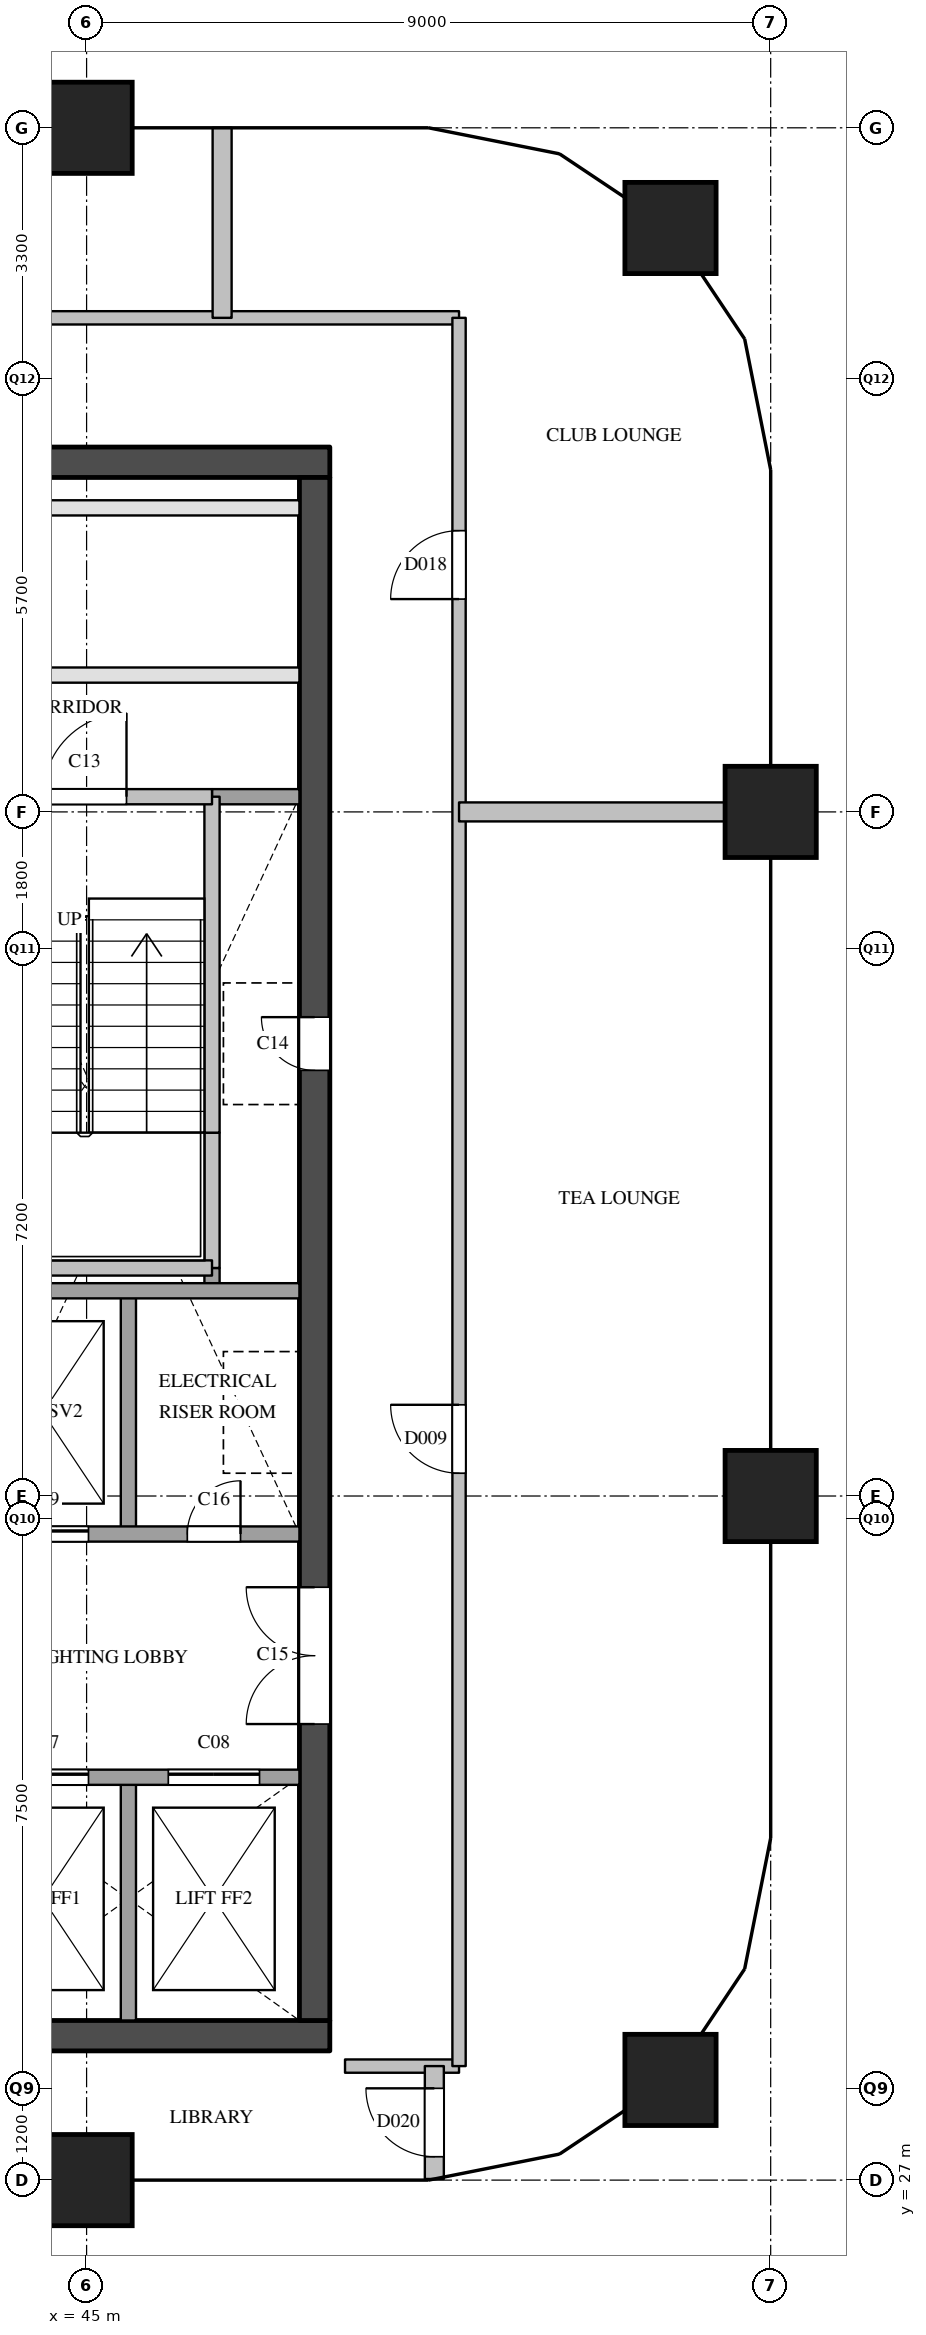
"""IFC4 building model, lengths in metres.
Left out: names, types, materials, properties, quantities, classifications, styles, units other than length and angle.
Written with IfcOpenShell. Run it as: python <this file> out.ifc"""

import sys

from ifc_helpers import new_model, si_unit, direction, frame, frame_2d, origin, origin_2d, place, context, subcontext, project, spatial, rectangle, extrude, element, fill, save


model = new_model("IFC4")
c1 = context("Model", 3, precision=1e-05, world=origin(), true_north=direction((0.0, 1.0)))
c2 = subcontext(c1, "Body", "Model", "MODEL_VIEW")
j1 = project(units=[si_unit("LENGTHUNIT", "METRE"), si_unit("PLANEANGLEUNIT", "RADIAN")], contexts=[c1])
p1 = place(None, origin())
s1 = spatial("IfcSite", under=j1, at=p1, CompositionType="ELEMENT")
p2 = place(p1, origin())
s2 = spatial("IfcBuilding", under=s1, at=p2, CompositionType="ELEMENT")
p3 = place(p2, frame((0.0, 0.0, 250.1)))
s3 = spatial("IfcBuildingStorey", under=s2, at=p3, CompositionType="ELEMENT", Elevation=250.1)
for number, where, z_axis, x_axis in (
    (1, (45.0, 27.0, 0.0), (0.0, 0.0, 1.0), (1.0, 0.0, 0.0)),
    (2, (45.0, 54.0, 0.0), (0.0, 0.0, 1.0), (1.0, 0.0, 0.0)),
    (3, (52.682, 28.318, 0.0), (0.0, 0.0, 1.0), (1.0, 0.0, 0.0)),
    (4, (54.0, 36.0, 0.0), (0.0, 0.0, 1.0), (1.0, 0.0, 0.0)),
    (5, (54.0, 45.0, 0.0), (0.0, 0.0, 1.0), (1.0, 0.0, 0.0)),
    (6, (52.682, 52.682, 0.0), (0.0, 0.0, 1.0), (1.0, 0.0, 0.0)),
):
    element("IfcColumn", number, at=place(p3, frame(where, z_axis=z_axis, x_axis=x_axis)), inside=s3, PredefinedType="COLUMN", context=c2, shape_type="SweptSolid", body=[
        extrude(rectangle(XDim=1.2, YDim=1.2, at=origin_2d()), origin(), (0.0, 0.0, 1.0), 3.9),
    ])
p4 = place(p3, frame((36.2, 28.9, 0.0), z_axis=(0.0, 0.0, 1.0), x_axis=(1.0, 0.0, 0.0)))
e7 = element("IfcWall", 7, at=p4, inside=s3, PredefinedType="SHEAR", context=c2, shape_type="SweptSolid", body=[
    extrude(rectangle(XDim=12.0, YDim=0.4, at=frame_2d((6.0, 0.0))), origin(), (0.0, 0.0, 1.0), 3.6),
])
p5 = place(p4, frame((0.85, 0.0, 0.0)))
e8 = element("IfcOpeningElement", 8, at=p5, cuts=e7, PredefinedType="OPENING", context=c2, shape_type="SweptSolid", body=[
    extrude(rectangle(XDim=1.2, YDim=2.1, at=frame_2d((0.6, 1.05))), frame((0.0, 0.21, 0.0), z_axis=(0.0, -1.0, 0.0), x_axis=(1.0, 0.0, 0.0)), (0.0, 0.0, 1.0), 0.42),
])
p6 = place(p4, frame((2.95, 0.0, 0.0)))
e9 = element("IfcOpeningElement", 9, at=p6, cuts=e7, PredefinedType="OPENING", context=c2, shape_type="SweptSolid", body=[
    extrude(rectangle(XDim=1.2, YDim=2.1, at=frame_2d((0.6, 1.05))), frame((0.0, 0.21, 0.0), z_axis=(0.0, -1.0, 0.0), x_axis=(1.0, 0.0, 0.0)), (0.0, 0.0, 1.0), 0.42),
])
p7 = place(p4, frame((5.05, 0.0, 0.0)))
e10 = element("IfcOpeningElement", 10, at=p7, cuts=e7, PredefinedType="OPENING", context=c2, shape_type="SweptSolid", body=[
    extrude(rectangle(XDim=1.2, YDim=2.1, at=frame_2d((0.6, 1.05))), frame((0.0, 0.21, 0.0), z_axis=(0.0, -1.0, 0.0), x_axis=(1.0, 0.0, 0.0)), (0.0, 0.0, 1.0), 0.42),
])
p8 = place(p3, frame((36.2, 49.6, 0.0), z_axis=(0.0, 0.0, 1.0), x_axis=(1.0, 0.0, 0.0)))
e11 = element("IfcWall", 11, at=p8, inside=s3, PredefinedType="SHEAR", context=c2, shape_type="SweptSolid", body=[
    extrude(rectangle(XDim=12.0, YDim=0.4, at=frame_2d((6.0, 0.0))), origin(), (0.0, 0.0, 1.0), 3.6),
])
p9 = place(p3, frame((48.0, 29.1, 0.0), z_axis=(0.0, 0.0, 1.0), x_axis=(0.0, 1.0, 0.0)))
e12 = element("IfcWall", 12, at=p9, inside=s3, PredefinedType="SHEAR", context=c2, shape_type="SweptSolid", body=[
    extrude(rectangle(XDim=20.3, YDim=0.4, at=frame_2d((10.15, 0.0))), origin(), (0.0, 0.0, 1.0), 3.6),
])
p10 = place(p9, frame((12.5, 0.0, 0.0)))
e13 = element("IfcOpeningElement", 13, at=p10, cuts=e12, PredefinedType="OPENING", context=c2, shape_type="SweptSolid", body=[
    extrude(rectangle(XDim=0.7, YDim=2.1, at=frame_2d((0.35, 1.05))), frame((0.0, 0.21, 0.0), z_axis=(0.0, -1.0, 0.0), x_axis=(1.0, 0.0, 0.0)), (0.0, 0.0, 1.0), 0.42),
])
p11 = place(p9, frame((3.9, 0.0, 0.0)))
e14 = element("IfcOpeningElement", 14, at=p11, cuts=e12, PredefinedType="OPENING", context=c2, shape_type="SweptSolid", body=[
    extrude(rectangle(XDim=1.8, YDim=2.1, at=frame_2d((0.9, 1.05))), frame((0.0, 0.21, 0.0), z_axis=(0.0, -1.0, 0.0), x_axis=(1.0, 0.0, 0.0)), (0.0, 0.0, 1.0), 0.42),
])
for number, where, z_axis, x_axis in (
    (15, (45.55, 29.1, 0.0), (0.0, 0.0, 1.0), (0.0, 1.0, 0.0)),
    (16, (45.55, 35.5, 0.0), (0.0, 0.0, 1.0), (0.0, 1.0, 0.0)),
):
    element("IfcWall", number, at=place(p3, frame(where, z_axis=z_axis, x_axis=x_axis)), inside=s3, PredefinedType="SOLIDWALL", context=c2, shape_type="SweptSolid", body=[
        extrude(rectangle(XDim=3.2, YDim=0.2, at=frame_2d((1.6, 0.0))), origin(), (0.0, 0.0, 1.0), 3.6),
    ])
p12 = place(p3, frame((46.65, 38.7, 0.0), z_axis=(0.0, 0.0, 1.0), x_axis=(0.0, 1.0, 0.0)))
e17 = element("IfcWall", 17, at=p12, inside=s3, PredefinedType="SOLIDWALL", context=c2, shape_type="SweptSolid", body=[
    extrude(rectangle(XDim=0.3, YDim=0.2, at=frame_2d((0.15, 0.0))), origin(), (0.0, 0.0, 1.0), 3.6),
])
p13 = place(p3, frame((46.65, 39.0, 0.0), z_axis=(0.0, 0.0, 1.0), x_axis=(0.0, 1.0, 0.0)))
e18 = element("IfcWall", 18, at=p13, inside=s3, PredefinedType="SOLIDWALL", context=c2, shape_type="SweptSolid", body=[
    extrude(rectangle(XDim=1.78, YDim=0.2, at=frame_2d((0.89, 0.0))), origin(), (0.0, 0.0, 1.0), 3.6),
])
p14 = place(p3, frame((46.65, 40.78, 0.0), z_axis=(0.0, 0.0, 1.0), x_axis=(0.0, 1.0, 0.0)))
e19 = element("IfcWall", 19, at=p14, inside=s3, PredefinedType="SOLIDWALL", context=c2, shape_type="SweptSolid", body=[
    extrude(rectangle(XDim=4.42, YDim=0.2, at=frame_2d((2.21, 0.0))), origin(), (0.0, 0.0, 1.0), 3.6),
])
p15 = place(p3, frame((36.6, 32.3, 0.0), z_axis=(0.0, 0.0, 1.0), x_axis=(1.0, 0.0, 0.0)))
e20 = element("IfcWall", 20, at=p15, inside=s3, PredefinedType="SOLIDWALL", context=c2, shape_type="SweptSolid", body=[
    extrude(rectangle(XDim=11.2, YDim=0.2, at=frame_2d((5.6, 0.0))), origin(), (0.0, 0.0, 1.0), 3.6),
])
p16 = place(p15, frame((7.225, 0.0, 0.0)))
e21 = element("IfcOpeningElement", 21, at=p16, cuts=e20, PredefinedType="OPENING", context=c2, shape_type="SweptSolid", body=[
    extrude(rectangle(XDim=1.2, YDim=2.1, at=frame_2d((0.6, 1.05))), frame((0.0, 0.11, 0.0), z_axis=(0.0, -1.0, 0.0), x_axis=(1.0, 0.0, 0.0)), (0.0, 0.0, 1.0), 0.22),
])
p17 = place(p15, frame((9.475, 0.0, 0.0)))
e22 = element("IfcOpeningElement", 22, at=p17, cuts=e20, PredefinedType="OPENING", context=c2, shape_type="SweptSolid", body=[
    extrude(rectangle(XDim=1.2, YDim=2.1, at=frame_2d((0.6, 1.05))), frame((0.0, 0.11, 0.0), z_axis=(0.0, -1.0, 0.0), x_axis=(1.0, 0.0, 0.0)), (0.0, 0.0, 1.0), 0.22),
])
p18 = place(p3, frame((43.3, 35.5, 0.0), z_axis=(0.0, 0.0, 1.0), x_axis=(1.0, 0.0, 0.0)))
e23 = element("IfcWall", 23, at=p18, inside=s3, PredefinedType="SOLIDWALL", context=c2, shape_type="SweptSolid", body=[
    extrude(rectangle(XDim=4.5, YDim=0.2, at=frame_2d((2.25, 0.0))), origin(), (0.0, 0.0, 1.0), 3.6),
])
p19 = place(p18, frame((0.525, 0.0, 0.0)))
e24 = element("IfcOpeningElement", 24, at=p19, cuts=e23, PredefinedType="OPENING", context=c2, shape_type="SweptSolid", body=[
    extrude(rectangle(XDim=1.2, YDim=2.1, at=frame_2d((0.6, 1.05))), frame((0.0, 0.11, 0.0), z_axis=(0.0, -1.0, 0.0), x_axis=(1.0, 0.0, 0.0)), (0.0, 0.0, 1.0), 0.22),
])
p20 = place(p18, frame((3.025, 0.0, 0.0)))
e25 = element("IfcOpeningElement", 25, at=p20, cuts=e23, PredefinedType="OPENING", context=c2, shape_type="SweptSolid", body=[
    extrude(rectangle(XDim=0.7, YDim=2.1, at=frame_2d((0.35, 1.05))), frame((0.0, 0.11, 0.0), z_axis=(0.0, -1.0, 0.0), x_axis=(1.0, 0.0, 0.0)), (0.0, 0.0, 1.0), 0.22),
])
p21 = place(p3, frame((43.3, 38.7, 0.0), z_axis=(0.0, 0.0, 1.0), x_axis=(1.0, 0.0, 0.0)))
e26 = element("IfcWall", 26, at=p21, inside=s3, PredefinedType="SOLIDWALL", context=c2, shape_type="SweptSolid", body=[
    extrude(rectangle(XDim=4.5, YDim=0.2, at=frame_2d((2.25, 0.0))), origin(), (0.0, 0.0, 1.0), 3.6),
])
p22 = place(p3, frame((43.4, 39.0, 0.0), z_axis=(0.0, 0.0, 1.0), x_axis=(1.0, 0.0, 0.0)))
e27 = element("IfcWall", 27, at=p22, inside=s3, PredefinedType="SOLIDWALL", context=c2, shape_type="SweptSolid", body=[
    extrude(rectangle(XDim=3.25, YDim=0.2, at=frame_2d((1.625, 0.0))), origin(), (0.0, 0.0, 1.0), 3.6),
])
p23 = place(p3, frame((46.65, 45.2, 0.0), z_axis=(0.0, 0.0, 1.0), x_axis=(1.0, 0.0, 0.0)))
e28 = element("IfcWall", 28, at=p23, inside=s3, PredefinedType="SOLIDWALL", context=c2, shape_type="SweptSolid", body=[
    extrude(rectangle(XDim=1.15, YDim=0.2, at=frame_2d((0.575, 0.0))), origin(), (0.0, 0.0, 1.0), 3.6),
])
p24 = place(p3, frame((36.6, 45.2, 0.0), z_axis=(0.0, 0.0, 1.0), x_axis=(1.0, 0.0, 0.0)))
e29 = element("IfcWall", 29, at=p24, inside=s3, PredefinedType="SOLIDWALL", context=c2, shape_type="SweptSolid", body=[
    extrude(rectangle(XDim=10.05, YDim=0.2, at=frame_2d((5.025, 0.0))), origin(), (0.0, 0.0, 1.0), 3.6),
])
p25 = place(p24, frame((1.125, 0.0, 0.0)))
e30 = element("IfcOpeningElement", 30, at=p25, cuts=e29, PredefinedType="OPENING", context=c2, shape_type="SweptSolid", body=[
    extrude(rectangle(XDim=1.1, YDim=2.1, at=frame_2d((0.55, 1.05))), frame((0.0, 0.11, 0.0), z_axis=(0.0, -1.0, 0.0), x_axis=(1.0, 0.0, 0.0)), (0.0, 0.0, 1.0), 0.22),
])
p26 = place(p24, frame((4.475, 0.0, 0.0)))
e31 = element("IfcOpeningElement", 31, at=p26, cuts=e29, PredefinedType="OPENING", context=c2, shape_type="SweptSolid", body=[
    extrude(rectangle(XDim=1.1, YDim=2.1, at=frame_2d((0.55, 1.05))), frame((0.0, 0.11, 0.0), z_axis=(0.0, -1.0, 0.0), x_axis=(1.0, 0.0, 0.0)), (0.0, 0.0, 1.0), 0.22),
])
p27 = place(p24, frame((7.825, 0.0, 0.0)))
e32 = element("IfcOpeningElement", 32, at=p27, cuts=e29, PredefinedType="OPENING", context=c2, shape_type="SweptSolid", body=[
    extrude(rectangle(XDim=1.1, YDim=2.1, at=frame_2d((0.55, 1.05))), frame((0.0, 0.11, 0.0), z_axis=(0.0, -1.0, 0.0), x_axis=(1.0, 0.0, 0.0)), (0.0, 0.0, 1.0), 0.22),
])
p28 = place(p3, frame((36.6, 46.8, 0.0), z_axis=(0.0, 0.0, 1.0), x_axis=(1.0, 0.0, 0.0)))
e33 = element("IfcWall", 33, at=p28, inside=s3, PredefinedType="PARTITIONING", context=c2, shape_type="SweptSolid", body=[
    extrude(rectangle(XDim=11.2, YDim=0.2, at=frame_2d((5.6, 0.0))), origin(), (0.0, 0.0, 1.0), 3.6),
])
p29 = place(p28, frame((5.15, 0.0, 0.0)))
e34 = element("IfcOpeningElement", 34, at=p29, cuts=e33, PredefinedType="OPENING", context=c2, shape_type="SweptSolid", body=[
    extrude(rectangle(XDim=0.9, YDim=2.1, at=frame_2d((0.45, 1.05))), frame((0.0, 0.11, 0.0), z_axis=(0.0, -1.0, 0.0), x_axis=(1.0, 0.0, 0.0)), (0.0, 0.0, 1.0), 0.22),
])
p30 = place(p3, frame((36.6, 49.0, 0.0), z_axis=(0.0, 0.0, 1.0), x_axis=(1.0, 0.0, 0.0)))
e35 = element("IfcWall", 35, at=p30, inside=s3, PredefinedType="PARTITIONING", context=c2, shape_type="SweptSolid", body=[
    extrude(rectangle(XDim=11.2, YDim=0.2, at=frame_2d((5.6, 0.0))), origin(), (0.0, 0.0, 1.0), 3.6),
])
p31 = place(p3, frame((48.4, 28.5, 0.0), z_axis=(0.0, 0.0, 1.0), x_axis=(1.0, 0.0, 0.0)))
e36 = element("IfcWall", 36, at=p31, inside=s3, PredefinedType="PARTITIONING", context=c2, shape_type="SweptSolid", body=[
    extrude(rectangle(XDim=1.5, YDim=0.175, at=frame_2d((0.75, 0.0))), origin(), (0.0, 0.0, 1.0), 3.6),
])
p32 = place(p3, frame((34.5, 51.5, 0.0), z_axis=(0.0, 0.0, 1.0), x_axis=(1.0, 0.0, 0.0)))
e37 = element("IfcWall", 37, at=p32, inside=s3, PredefinedType="PARTITIONING", context=c2, shape_type="SweptSolid", body=[
    extrude(rectangle(XDim=15.4, YDim=0.175, at=frame_2d((7.7, 0.0))), origin(), (0.0, 0.0, 1.0), 3.6),
])
p33 = place(p32, frame((5.892, 0.0, 0.0)))
e38 = element("IfcOpeningElement", 38, at=p33, cuts=e37, PredefinedType="OPENING", context=c2, shape_type="SweptSolid", body=[
    extrude(rectangle(XDim=1.0, YDim=2.1, at=frame_2d((0.5, 1.05))), frame((0.0, 0.097, 0.0), z_axis=(0.0, -1.0, 0.0), x_axis=(1.0, 0.0, 0.0)), (0.0, 0.0, 1.0), 0.195),
])
p34 = place(p3, frame((49.9, 28.5, 0.0), z_axis=(0.0, 0.0, 1.0), x_axis=(0.0, 1.0, 0.0)))
e39 = element("IfcWall", 39, at=p34, inside=s3, PredefinedType="PARTITIONING", context=c2, shape_type="SweptSolid", body=[
    extrude(rectangle(XDim=23.0, YDim=0.175, at=frame_2d((11.5, 0.0))), origin(), (0.0, 0.0, 1.0), 3.6),
])
p35 = place(p34, frame((7.8, 0.0, 0.0)))
e40 = element("IfcOpeningElement", 40, at=p35, cuts=e39, PredefinedType="OPENING", context=c2, shape_type="SweptSolid", body=[
    extrude(rectangle(XDim=0.9, YDim=2.1, at=frame_2d((0.45, 1.05))), frame((0.0, 0.097, 0.0), z_axis=(0.0, -1.0, 0.0), x_axis=(1.0, 0.0, 0.0)), (0.0, 0.0, 1.0), 0.195),
])
p36 = place(p34, frame((19.3, 0.0, 0.0)))
e41 = element("IfcOpeningElement", 41, at=p36, cuts=e39, PredefinedType="OPENING", context=c2, shape_type="SweptSolid", body=[
    extrude(rectangle(XDim=0.9, YDim=2.1, at=frame_2d((0.45, 1.05))), frame((0.0, 0.097, 0.0), z_axis=(0.0, -1.0, 0.0), x_axis=(1.0, 0.0, 0.0)), (0.0, 0.0, 1.0), 0.195),
])
p37 = place(p3, frame((49.9, 45.0, 0.0), z_axis=(0.0, 0.0, 1.0), x_axis=(1.0, 0.0, 0.0)))
e42 = element("IfcWall", 42, at=p37, inside=s3, PredefinedType="PARTITIONING", context=c2, shape_type="SweptSolid", body=[
    extrude(rectangle(XDim=4.1, YDim=0.25, at=frame_2d((2.05, 0.0))), origin(), (0.0, 0.0, 1.0), 3.6),
])
p38 = place(p3, frame((46.783, 51.5, 0.0), z_axis=(0.0, 0.0, 1.0), x_axis=(0.0, 1.0, 0.0)))
e43 = element("IfcWall", 43, at=p38, inside=s3, PredefinedType="PARTITIONING", context=c2, shape_type="SweptSolid", body=[
    extrude(rectangle(XDim=2.5, YDim=0.25, at=frame_2d((1.25, 0.0))), origin(), (0.0, 0.0, 1.0), 2.6),
])
p39 = place(p3, frame((49.575, 27.015, 0.0), z_axis=(0.0, 0.0, 1.0), x_axis=(0.0, 1.0, 0.0)))
e44 = element("IfcWall", 44, at=p39, inside=s3, PredefinedType="PARTITIONING", context=c2, shape_type="SweptSolid", body=[
    extrude(rectangle(XDim=1.485, YDim=0.25, at=frame_2d((0.743, 0.0))), origin(), (0.0, 0.0, 1.0), 2.6),
])
p40 = place(p39, frame((0.292, 0.0, 0.0)))
e45 = element("IfcOpeningElement", 45, at=p40, cuts=e44, PredefinedType="OPENING", context=c2, shape_type="SweptSolid", body=[
    extrude(rectangle(XDim=0.9, YDim=2.1, at=frame_2d((0.45, 1.05))), frame((0.0, 0.135, 0.0), z_axis=(0.0, -1.0, 0.0), x_axis=(1.0, 0.0, 0.0)), (0.0, 0.0, 1.0), 0.27),
])
p41 = place(p16, origin())
e46 = element("IfcDoor", 46, at=p41, inside=s3, OperationType="SLIDING_TO_LEFT", PredefinedType="DOOR", context=c2, shape_type="SweptSolid", body=[
    extrude(rectangle(XDim=1.2, YDim=2.1, at=frame_2d((0.6, 1.05))), frame((0.0, 0.025, 0.0), z_axis=(0.0, -1.0, 0.0), x_axis=(1.0, 0.0, 0.0)), (0.0, 0.0, 1.0), 0.05),
])
fill(e21, e46)
p42 = place(p17, origin())
e47 = element("IfcDoor", 47, at=p42, inside=s3, OperationType="SLIDING_TO_LEFT", PredefinedType="DOOR", context=c2, shape_type="SweptSolid", body=[
    extrude(rectangle(XDim=1.2, YDim=2.1, at=frame_2d((0.6, 1.05))), frame((0.0, 0.025, 0.0), z_axis=(0.0, -1.0, 0.0), x_axis=(1.0, 0.0, 0.0)), (0.0, 0.0, 1.0), 0.05),
])
fill(e22, e47)
p43 = place(p19, origin())
e48 = element("IfcDoor", 48, at=p43, inside=s3, OperationType="SLIDING_TO_LEFT", PredefinedType="DOOR", context=c2, shape_type="SweptSolid", body=[
    extrude(rectangle(XDim=1.2, YDim=2.1, at=frame_2d((0.6, 1.05))), frame((0.0, 0.025, 0.0), z_axis=(0.0, -1.0, 0.0), x_axis=(1.0, 0.0, 0.0)), (0.0, 0.0, 1.0), 0.05),
])
fill(e24, e48)
p44 = place(p27, origin())
e49 = element("IfcDoor", 49, at=p44, inside=s3, OperationType="SINGLE_SWING_RIGHT", PredefinedType="DOOR", context=c2, shape_type="SweptSolid", body=[
    extrude(rectangle(XDim=1.1, YDim=2.1, at=frame_2d((0.55, 1.05))), frame((0.0, 0.025, 0.0), z_axis=(0.0, -1.0, 0.0), x_axis=(1.0, 0.0, 0.0)), (0.0, 0.0, 1.0), 0.05),
])
fill(e32, e49)
p45 = place(p10, origin())
e50 = element("IfcDoor", 50, at=p45, inside=s3, OperationType="SINGLE_SWING_RIGHT", PredefinedType="DOOR", context=c2, shape_type="SweptSolid", body=[
    extrude(rectangle(XDim=0.7, YDim=2.1, at=frame_2d((0.35, 1.05))), frame((0.0, 0.025, 0.0), z_axis=(0.0, -1.0, 0.0), x_axis=(1.0, 0.0, 0.0)), (0.0, 0.0, 1.0), 0.05),
])
fill(e13, e50)
p46 = place(p11, origin())
e51 = element("IfcDoor", 51, at=p46, inside=s3, OperationType="DOUBLE_DOOR_SINGLE_SWING", PredefinedType="DOOR", context=c2, shape_type="SweptSolid", body=[
    extrude(rectangle(XDim=1.8, YDim=2.1, at=frame_2d((0.9, 1.05))), frame((0.0, 0.025, 0.0), z_axis=(0.0, -1.0, 0.0), x_axis=(1.0, 0.0, 0.0)), (0.0, 0.0, 1.0), 0.05),
])
fill(e14, e51)
p47 = place(p20, origin())
e52 = element("IfcDoor", 52, at=p47, inside=s3, OperationType="SINGLE_SWING_RIGHT", PredefinedType="DOOR", context=c2, shape_type="SweptSolid", body=[
    extrude(rectangle(XDim=0.7, YDim=2.1, at=frame_2d((0.35, 1.05))), frame((0.0, 0.025, 0.0), z_axis=(0.0, -1.0, 0.0), x_axis=(1.0, 0.0, 0.0)), (0.0, 0.0, 1.0), 0.05),
])
fill(e25, e52)
p48 = place(p35, origin())
e53 = element("IfcDoor", 53, at=p48, inside=s3, OperationType="SINGLE_SWING_RIGHT", PredefinedType="DOOR", context=c2, shape_type="SweptSolid", body=[
    extrude(rectangle(XDim=0.9, YDim=2.1, at=frame_2d((0.45, 1.05))), frame((0.0, 0.025, 0.0), z_axis=(0.0, -1.0, 0.0), x_axis=(1.0, 0.0, 0.0)), (0.0, 0.0, 1.0), 0.05),
])
fill(e40, e53)
p49 = place(p36, origin())
e54 = element("IfcDoor", 54, at=p49, inside=s3, OperationType="SINGLE_SWING_LEFT", PredefinedType="DOOR", context=c2, shape_type="SweptSolid", body=[
    extrude(rectangle(XDim=0.9, YDim=2.1, at=frame_2d((0.45, 1.05))), frame((0.0, 0.025, 0.0), z_axis=(0.0, -1.0, 0.0), x_axis=(1.0, 0.0, 0.0)), (0.0, 0.0, 1.0), 0.05),
])
fill(e41, e54)
p50 = place(p40, origin())
e55 = element("IfcDoor", 55, at=p50, inside=s3, OperationType="SINGLE_SWING_RIGHT", PredefinedType="DOOR", context=c2, shape_type="SweptSolid", body=[
    extrude(rectangle(XDim=0.9, YDim=2.1, at=frame_2d((0.45, 1.05))), frame((0.0, 0.025, 0.0), z_axis=(0.0, -1.0, 0.0), x_axis=(1.0, 0.0, 0.0)), (0.0, 0.0, 1.0), 0.05),
])
fill(e45, e55)
save(model, sys.argv[1])
